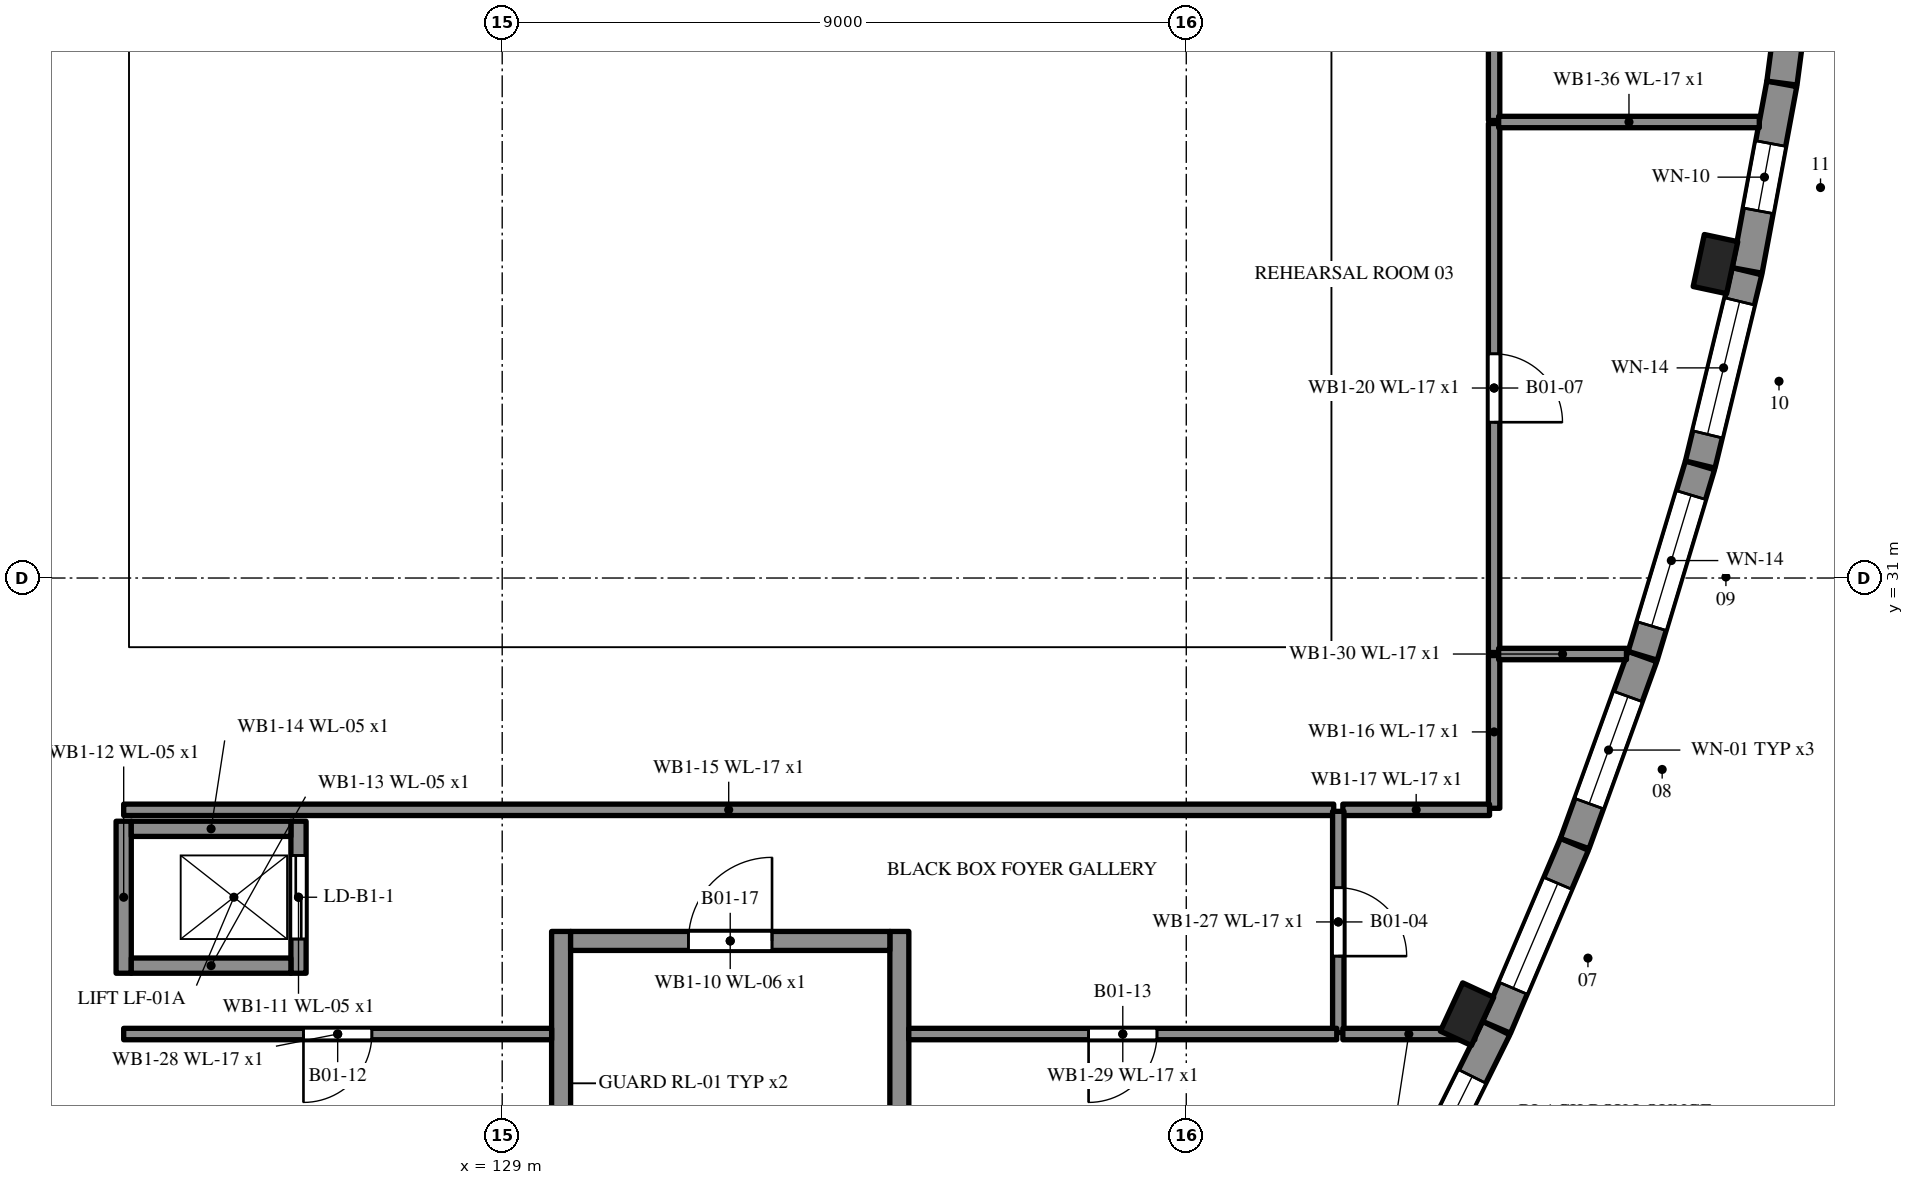
"""IFC4 building model, lengths in metres.
Left out: names, types, materials, properties, quantities, classifications, styles, units other than length and angle.
Written with IfcOpenShell. Run it as: python <this file> out.ifc"""

import sys

from ifc_helpers import new_model, si_unit, direction, frame, frame_2d, origin, origin_2d, place, context, subcontext, project, spatial, rectangle, extrude, element, fill, save


model = new_model("IFC4")
c1 = context("Model", 3, precision=1e-05, world=origin(), true_north=direction((0.0, 1.0)))
c2 = subcontext(c1, "Body", "Model", "MODEL_VIEW")
j1 = project(units=[si_unit("LENGTHUNIT", "METRE"), si_unit("PLANEANGLEUNIT", "RADIAN")], contexts=[c1])
p1 = place(None, origin())
s1 = spatial("IfcSite", under=j1, at=p1, CompositionType="ELEMENT")
p2 = place(p1, origin())
s2 = spatial("IfcBuilding", under=s1, at=p2, CompositionType="ELEMENT")
p3 = place(p2, frame((0.0, 0.0, 5.4)))
s3 = spatial("IfcBuildingStorey", under=s2, at=p3, CompositionType="ELEMENT", Elevation=5.4)
p4 = place(p3, frame((140.78, 22.463, 0.0), z_axis=(0.0, 0.0, 1.0), x_axis=(0.44433489597, 0.895860759395, 0.0)))
e1 = element("IfcWall", 1, at=p4, inside=s3, PredefinedType="SOLIDWALL", context=c2, shape_type="SweptSolid", body=[
    extrude(rectangle(XDim=2.92, YDim=0.4, at=frame_2d((1.46, 0.0))), origin(), (0.0, 0.0, 1.0), 4.8),
])
p5 = place(p4, frame((0.71, 0.0, 2.4)))
e2 = element("IfcOpeningElement", 2, at=p5, cuts=e1, PredefinedType="OPENING", context=c2, shape_type="SweptSolid", body=[
    extrude(rectangle(XDim=1.5, YDim=0.9, at=frame_2d((0.75, 0.45))), frame((0.0, 0.21, 0.0), z_axis=(0.0, -1.0, 0.0), x_axis=(1.0, 0.0, 0.0)), (0.0, 0.0, 1.0), 0.42),
])
p6 = place(p3, frame((142.083, 25.089, 0.0), z_axis=(0.0, 0.0, 1.0), x_axis=(0.391529943778, 0.920165367271, 0.0)))
e3 = element("IfcWall", 3, at=p6, inside=s3, PredefinedType="SOLIDWALL", context=c2, shape_type="SweptSolid", body=[
    extrude(rectangle(XDim=2.616, YDim=0.4, at=frame_2d((1.308, 0.0))), origin(), (0.0, 0.0, 1.0), 4.8),
])
p7 = place(p6, frame((0.558, 0.0, 0.9)))
e4 = element("IfcOpeningElement", 4, at=p7, cuts=e3, PredefinedType="OPENING", context=c2, shape_type="SweptSolid", body=[
    extrude(rectangle(XDim=1.5, YDim=2.1, at=frame_2d((0.75, 1.05))), frame((0.0, 0.21, 0.0), z_axis=(0.0, -1.0, 0.0), x_axis=(1.0, 0.0, 0.0)), (0.0, 0.0, 1.0), 0.42),
])
p8 = place(p3, frame((143.111, 27.506, 0.0), z_axis=(0.0, 0.0, 1.0), x_axis=(0.340394146267, 0.940282843184, 0.0)))
e5 = element("IfcWall", 5, at=p8, inside=s3, PredefinedType="SOLIDWALL", context=c2, shape_type="SweptSolid", body=[
    extrude(rectangle(XDim=2.616, YDim=0.4, at=frame_2d((1.308, 0.0))), origin(), (0.0, 0.0, 1.0), 4.8),
])
p9 = place(p8, frame((0.558, 0.0, 0.9)))
e6 = element("IfcOpeningElement", 6, at=p9, cuts=e5, PredefinedType="OPENING", context=c2, shape_type="SweptSolid", body=[
    extrude(rectangle(XDim=1.5, YDim=2.1, at=frame_2d((0.75, 1.05))), frame((0.0, 0.21, 0.0), z_axis=(0.0, -1.0, 0.0), x_axis=(1.0, 0.0, 0.0)), (0.0, 0.0, 1.0), 0.42),
])
p10 = place(p3, frame((144.005, 29.977, 0.0), z_axis=(0.0, 0.0, 1.0), x_axis=(0.288212317298, 0.957566530408, 0.0)))
e7 = element("IfcWall", 7, at=p10, inside=s3, PredefinedType="SOLIDWALL", context=c2, shape_type="SweptSolid", body=[
    extrude(rectangle(XDim=2.617, YDim=0.4, at=frame_2d((1.308, 0.0))), origin(), (0.0, 0.0, 1.0), 4.8),
])
p11 = place(p10, frame((0.408, 0.0, 0.9)))
e8 = element("IfcOpeningElement", 8, at=p11, cuts=e7, PredefinedType="OPENING", context=c2, shape_type="SweptSolid", body=[
    extrude(rectangle(XDim=1.8, YDim=2.1, at=frame_2d((0.9, 1.05))), frame((0.0, 0.21, 0.0), z_axis=(0.0, -1.0, 0.0), x_axis=(1.0, 0.0, 0.0)), (0.0, 0.0, 1.0), 0.42),
])
p12 = place(p3, frame((144.762, 32.493, 0.0), z_axis=(0.0, 0.0, 1.0), x_axis=(0.235108668597, 0.971969091047, 0.0)))
e9 = element("IfcWall", 9, at=p12, inside=s3, PredefinedType="SOLIDWALL", context=c2, shape_type="SweptSolid", body=[
    extrude(rectangle(XDim=2.617, YDim=0.4, at=frame_2d((1.308, 0.0))), origin(), (0.0, 0.0, 1.0), 4.8),
])
p13 = place(p12, frame((0.408, 0.0, 0.9)))
e10 = element("IfcOpeningElement", 10, at=p13, cuts=e9, PredefinedType="OPENING", context=c2, shape_type="SweptSolid", body=[
    extrude(rectangle(XDim=1.8, YDim=2.1, at=frame_2d((0.9, 1.05))), frame((0.0, 0.21, 0.0), z_axis=(0.0, -1.0, 0.0), x_axis=(1.0, 0.0, 0.0)), (0.0, 0.0, 1.0), 0.42),
])
p14 = place(p3, frame((145.379, 35.047, 0.0), z_axis=(0.0, 0.0, 1.0), x_axis=(0.182652956339, 0.983177449671, 0.0)))
e11 = element("IfcWall", 11, at=p14, inside=s3, PredefinedType="SOLIDWALL", context=c2, shape_type="SweptSolid", body=[
    extrude(rectangle(XDim=2.497, YDim=0.4, at=frame_2d((1.249, 0.0))), origin(), (0.0, 0.0, 1.0), 4.8),
])
p15 = place(p14, frame((0.798, 0.0, 0.9)))
e12 = element("IfcOpeningElement", 12, at=p15, cuts=e11, PredefinedType="OPENING", context=c2, shape_type="SweptSolid", body=[
    extrude(rectangle(XDim=0.9, YDim=2.1, at=frame_2d((0.45, 1.05))), frame((0.0, 0.21, 0.0), z_axis=(0.0, -1.0, 0.0), x_axis=(1.0, 0.0, 0.0)), (0.0, 0.0, 1.0), 0.42),
])
p16 = place(p3, frame((145.837, 37.512, 0.0), z_axis=(0.0, 0.0, 1.0), x_axis=(0.130722601708, 0.991418983782, 0.0)))
e13 = element("IfcWall", 13, at=p16, inside=s3, PredefinedType="SOLIDWALL", context=c2, shape_type="SweptSolid", body=[
    extrude(rectangle(XDim=2.497, YDim=0.4, at=frame_2d((1.249, 0.0))), origin(), (0.0, 0.0, 1.0), 4.8),
])
p17 = place(p16, frame((0.499, 0.0, 0.9)))
e14 = element("IfcOpeningElement", 14, at=p17, cuts=e13, PredefinedType="OPENING", context=c2, shape_type="SweptSolid", body=[
    extrude(rectangle(XDim=1.5, YDim=2.1, at=frame_2d((0.75, 1.05))), frame((0.0, 0.21, 0.0), z_axis=(0.0, -1.0, 0.0), x_axis=(1.0, 0.0, 0.0)), (0.0, 0.0, 1.0), 0.42),
])
p18 = place(p3, frame((121.922, 25.078, 0.0), z_axis=(0.0, 0.0, 1.0), x_axis=(0.44433489597, -0.895860759395, 0.0)))
e15 = element("IfcWall", 15, at=p18, inside=s3, PredefinedType="SOLIDWALL", context=c2, shape_type="SweptSolid", body=[
    extrude(rectangle(XDim=2.92, YDim=0.4, at=frame_2d((1.46, 0.0))), origin(), (0.0, 0.0, 1.0), 4.8),
])
p19 = place(p18, frame((0.71, 0.0, 2.4)))
e16 = element("IfcOpeningElement", 16, at=p19, cuts=e15, PredefinedType="OPENING", context=c2, shape_type="SweptSolid", body=[
    extrude(rectangle(XDim=1.5, YDim=0.9, at=frame_2d((0.75, 0.45))), frame((0.0, 0.21, 0.0), z_axis=(0.0, -1.0, 0.0), x_axis=(1.0, 0.0, 0.0)), (0.0, 0.0, 1.0), 0.42),
])
for number, where, z_axis, x_axis in (
    (17, (141.694, 25.261, 0.0), (0.0, 0.0, 1.0), (0.42, 0.908, 0.0)),
    (18, (144.963, 35.131, 0.0), (0.0, 0.0, 1.0), (0.21, 0.978, 0.0)),
):
    element("IfcColumn", number, at=place(p3, frame(where, z_axis=z_axis, x_axis=x_axis)), inside=s3, PredefinedType="PILASTER", context=c2, shape_type="SweptSolid", body=[
        extrude(rectangle(XDim=0.7, YDim=0.45, at=origin_2d()), origin(), (0.0, 0.0, 1.0), 4.8),
    ])
for number, where, z_axis, x_axis in (
    (19, (129.775, 26.35, 0.0), (0.0, 0.0, 1.0), (0.0, -1.0, 0.0)),
    (20, (134.225, 17.8, 0.0), (0.0, 0.0, 1.0), (0.0, 1.0, 0.0)),
):
    element("IfcWall", number, at=place(p3, frame(where, z_axis=z_axis, x_axis=x_axis)), inside=s3, PredefinedType="SHEAR", context=c2, shape_type="SweptSolid", body=[
        extrude(rectangle(XDim=8.55, YDim=0.25, at=frame_2d((4.275, 0.0))), origin(), (0.0, 0.0, 1.0), 4.5),
    ])
p20 = place(p3, frame((129.9, 26.225, 0.0), z_axis=(0.0, 0.0, 1.0), x_axis=(1.0, 0.0, 0.0)))
e21 = element("IfcWall", 21, at=p20, inside=s3, PredefinedType="SHEAR", context=c2, shape_type="SweptSolid", body=[
    extrude(rectangle(XDim=4.2, YDim=0.25, at=frame_2d((2.1, 0.0))), origin(), (0.0, 0.0, 1.0), 4.5),
])
p21 = place(p20, frame((1.55, 0.0, 0.0)))
e22 = element("IfcOpeningElement", 22, at=p21, cuts=e21, PredefinedType="OPENING", context=c2, shape_type="SweptSolid", body=[
    extrude(rectangle(XDim=1.1, YDim=2.1, at=frame_2d((0.55, 1.05))), frame((0.0, 0.135, 0.0), z_axis=(0.0, -1.0, 0.0), x_axis=(1.0, 0.0, 0.0)), (0.0, 0.0, 1.0), 0.27),
])
p22 = place(p3, frame((126.32, 25.8, 0.0), z_axis=(0.0, 0.0, 1.0), x_axis=(0.0, 1.0, 0.0)))
e23 = element("IfcWall", 23, at=p22, inside=s3, PredefinedType="SHEAR", context=c2, shape_type="SweptSolid", body=[
    extrude(rectangle(XDim=2.0, YDim=0.2, at=frame_2d((1.0, 0.0))), origin(), (0.0, 0.0, 1.0), 3.9),
])
p23 = place(p22, frame((0.45, 0.0, 0.0)))
e24 = element("IfcOpeningElement", 24, at=p23, cuts=e23, PredefinedType="OPENING", context=c2, shape_type="SweptSolid", body=[
    extrude(rectangle(XDim=1.1, YDim=2.2, at=frame_2d((0.55, 1.1))), frame((0.0, 0.11, 0.0), z_axis=(0.0, -1.0, 0.0), x_axis=(1.0, 0.0, 0.0)), (0.0, 0.0, 1.0), 0.22),
])
p24 = place(p3, frame((124.02, 27.8, 0.0), z_axis=(0.0, 0.0, 1.0), x_axis=(0.0, -1.0, 0.0)))
e25 = element("IfcWall", 25, at=p24, inside=s3, PredefinedType="SHEAR", context=c2, shape_type="SweptSolid", body=[
    extrude(rectangle(XDim=2.0, YDim=0.2, at=frame_2d((1.0, 0.0))), origin(), (0.0, 0.0, 1.0), 3.9),
])
for number, where, z_axis, x_axis in (
    (26, (124.12, 25.9, 0.0), (0.0, 0.0, 1.0), (1.0, 0.0, 0.0)),
    (27, (126.22, 27.7, 0.0), (0.0, 0.0, 1.0), (-1.0, 0.0, 0.0)),
):
    element("IfcWall", number, at=place(p3, frame(where, z_axis=z_axis, x_axis=x_axis)), inside=s3, PredefinedType="SHEAR", context=c2, shape_type="SweptSolid", body=[
        extrude(rectangle(XDim=2.1, YDim=0.2, at=frame_2d((1.05, 0.0))), origin(), (0.0, 0.0, 1.0), 3.9),
    ])
p25 = place(p3, frame((139.94, 27.95, 0.0), z_axis=(0.0, 0.0, 1.0), x_axis=(-1.0, 0.0, 0.0)))
e28 = element("IfcWall", 28, at=p25, inside=s3, PredefinedType="PARTITIONING", context=c2, shape_type="SweptSolid", body=[
    extrude(rectangle(XDim=15.92, YDim=0.15, at=frame_2d((7.96, 0.0))), origin(), (0.0, 0.0, 1.0), 4.5),
])
p26 = place(p3, frame((142.05, 29.98, 0.0), z_axis=(0.0, 0.0, 1.0), x_axis=(0.0, -1.0, 0.0)))
e29 = element("IfcWall", 29, at=p26, inside=s3, PredefinedType="PARTITIONING", context=c2, shape_type="SweptSolid", body=[
    extrude(rectangle(XDim=2.01, YDim=0.15, at=frame_2d((1.005, 0.0))), origin(), (0.0, 0.0, 1.0), 4.5),
])
p27 = place(p3, frame((141.99, 27.95, 0.0), z_axis=(0.0, 0.0, 1.0), x_axis=(-1.0, 0.0, 0.0)))
e30 = element("IfcWall", 30, at=p27, inside=s3, PredefinedType="PARTITIONING", context=c2, shape_type="SweptSolid", body=[
    extrude(rectangle(XDim=1.93, YDim=0.15, at=frame_2d((0.965, 0.0))), origin(), (0.0, 0.0, 1.0), 4.5),
])
p28 = place(p3, frame((142.05, 36.98, 0.0), z_axis=(0.0, 0.0, 1.0), x_axis=(0.0, -1.0, 0.0)))
e31 = element("IfcWall", 31, at=p28, inside=s3, PredefinedType="PARTITIONING", context=c2, shape_type="SweptSolid", body=[
    extrude(rectangle(XDim=6.96, YDim=0.15, at=frame_2d((3.48, 0.0))), origin(), (0.0, 0.0, 1.0), 4.5),
])
p29 = place(p28, frame((3.03, 0.0, 0.0)))
e32 = element("IfcOpeningElement", 32, at=p29, cuts=e31, PredefinedType="OPENING", context=c2, shape_type="SweptSolid", body=[
    extrude(rectangle(XDim=0.9, YDim=2.1, at=frame_2d((0.45, 1.05))), frame((0.0, 0.085, 0.0), z_axis=(0.0, -1.0, 0.0), x_axis=(1.0, 0.0, 0.0)), (0.0, 0.0, 1.0), 0.17),
])
p30 = place(p3, frame((142.05, 42.98, 0.0), z_axis=(0.0, 0.0, 1.0), x_axis=(0.0, -1.0, 0.0)))
e33 = element("IfcWall", 33, at=p30, inside=s3, PredefinedType="PARTITIONING", context=c2, shape_type="SweptSolid", body=[
    extrude(rectangle(XDim=5.96, YDim=0.15, at=frame_2d((2.98, 0.0))), origin(), (0.0, 0.0, 1.0), 4.5),
])
p31 = place(p30, frame((2.53, 0.0, 0.0)))
e34 = element("IfcOpeningElement", 34, at=p31, cuts=e33, PredefinedType="OPENING", context=c2, shape_type="SweptSolid", body=[
    extrude(rectangle(XDim=0.9, YDim=2.1, at=frame_2d((0.45, 1.05))), frame((0.0, 0.085, 0.0), z_axis=(0.0, -1.0, 0.0), x_axis=(1.0, 0.0, 0.0)), (0.0, 0.0, 1.0), 0.17),
])
p32 = place(p3, frame((140.0, 27.93, 0.0), z_axis=(0.0, 0.0, 1.0), x_axis=(0.0, -1.0, 0.0)))
e35 = element("IfcWall", 35, at=p32, inside=s3, PredefinedType="PARTITIONING", context=c2, shape_type="SweptSolid", body=[
    extrude(rectangle(XDim=2.91, YDim=0.15, at=frame_2d((1.455, 0.0))), origin(), (0.0, 0.0, 1.0), 4.5),
])
p33 = place(p32, frame((1.005, 0.0, 0.0)))
e36 = element("IfcOpeningElement", 36, at=p33, cuts=e35, PredefinedType="OPENING", context=c2, shape_type="SweptSolid", body=[
    extrude(rectangle(XDim=0.9, YDim=2.1, at=frame_2d((0.45, 1.05))), frame((0.0, 0.085, 0.0), z_axis=(0.0, -1.0, 0.0), x_axis=(1.0, 0.0, 0.0)), (0.0, 0.0, 1.0), 0.17),
])
p34 = place(p3, frame((129.65, 25.0, 0.0), z_axis=(0.0, 0.0, 1.0), x_axis=(-1.0, 0.0, 0.0)))
e37 = element("IfcWall", 37, at=p34, inside=s3, PredefinedType="PARTITIONING", context=c2, shape_type="SweptSolid", body=[
    extrude(rectangle(XDim=5.63, YDim=0.15, at=frame_2d((2.815, 0.0))), origin(), (0.0, 0.0, 1.0), 4.5),
])
p35 = place(p34, frame((2.365, 0.0, 0.0)))
e38 = element("IfcOpeningElement", 38, at=p35, cuts=e37, PredefinedType="OPENING", context=c2, shape_type="SweptSolid", body=[
    extrude(rectangle(XDim=0.9, YDim=2.1, at=frame_2d((0.45, 1.05))), frame((0.0, 0.085, 0.0), z_axis=(0.0, -1.0, 0.0), x_axis=(1.0, 0.0, 0.0)), (0.0, 0.0, 1.0), 0.17),
])
p36 = place(p3, frame((139.98, 25.0, 0.0), z_axis=(0.0, 0.0, 1.0), x_axis=(-1.0, 0.0, 0.0)))
e39 = element("IfcWall", 39, at=p36, inside=s3, PredefinedType="PARTITIONING", context=c2, shape_type="SweptSolid", body=[
    extrude(rectangle(XDim=5.63, YDim=0.15, at=frame_2d((2.815, 0.0))), origin(), (0.0, 0.0, 1.0), 4.5),
])
p37 = place(p36, frame((2.365, 0.0, 0.0)))
e40 = element("IfcOpeningElement", 40, at=p37, cuts=e39, PredefinedType="OPENING", context=c2, shape_type="SweptSolid", body=[
    extrude(rectangle(XDim=0.9, YDim=2.1, at=frame_2d((0.45, 1.05))), frame((0.0, 0.085, 0.0), z_axis=(0.0, -1.0, 0.0), x_axis=(1.0, 0.0, 0.0)), (0.0, 0.0, 1.0), 0.17),
])
p38 = place(p3, frame((142.11, 30.0, 0.0), z_axis=(0.0, 0.0, 1.0), x_axis=(1.0, 0.0, 0.0)))
e41 = element("IfcWall", 41, at=p38, inside=s3, PredefinedType="PARTITIONING", context=c2, shape_type="SweptSolid", body=[
    extrude(rectangle(XDim=1.681, YDim=0.15, at=frame_2d((0.841, 0.0))), origin(), (0.0, 0.0, 1.0), 4.5),
])
p39 = place(p3, frame((141.796, 25.0, 0.0), z_axis=(0.0, 0.0, 1.0), x_axis=(-1.0, 0.0, 0.0)))
e42 = element("IfcWall", 42, at=p39, inside=s3, PredefinedType="PARTITIONING", context=c2, shape_type="SweptSolid", body=[
    extrude(rectangle(XDim=1.736, YDim=0.15, at=frame_2d((0.868, 0.0))), origin(), (0.0, 0.0, 1.0), 4.5),
])
p40 = place(p3, frame((142.11, 37.0, 0.0), z_axis=(0.0, 0.0, 1.0), x_axis=(1.0, 0.0, 0.0)))
e43 = element("IfcWall", 43, at=p40, inside=s3, PredefinedType="PARTITIONING", context=c2, shape_type="SweptSolid", body=[
    extrude(rectangle(XDim=3.429, YDim=0.15, at=frame_2d((1.714, 0.0))), origin(), (0.0, 0.0, 1.0), 4.5),
])
p41 = place(p5, origin())
e44 = element("IfcWindow", 44, at=p41, inside=s3, PartitioningType="SINGLE_PANEL", PredefinedType="WINDOW", context=c2, shape_type="SweptSolid", body=[
    extrude(rectangle(XDim=1.5, YDim=0.9, at=frame_2d((0.75, 0.45))), frame((0.0, 0.03, 0.0), z_axis=(0.0, -1.0, 0.0), x_axis=(1.0, 0.0, 0.0)), (0.0, 0.0, 1.0), 0.06),
])
fill(e2, e44)
p42 = place(p7, origin())
e45 = element("IfcWindow", 45, at=p42, inside=s3, PartitioningType="SINGLE_PANEL", PredefinedType="WINDOW", context=c2, shape_type="SweptSolid", body=[
    extrude(rectangle(XDim=1.5, YDim=2.1, at=frame_2d((0.75, 1.05))), frame((0.0, 0.03, 0.0), z_axis=(0.0, -1.0, 0.0), x_axis=(1.0, 0.0, 0.0)), (0.0, 0.0, 1.0), 0.06),
])
fill(e4, e45)
p43 = place(p9, origin())
e46 = element("IfcWindow", 46, at=p43, inside=s3, PartitioningType="SINGLE_PANEL", PredefinedType="WINDOW", context=c2, shape_type="SweptSolid", body=[
    extrude(rectangle(XDim=1.5, YDim=2.1, at=frame_2d((0.75, 1.05))), frame((0.0, 0.03, 0.0), z_axis=(0.0, -1.0, 0.0), x_axis=(1.0, 0.0, 0.0)), (0.0, 0.0, 1.0), 0.06),
])
fill(e6, e46)
p44 = place(p11, origin())
e47 = element("IfcWindow", 47, at=p44, inside=s3, PartitioningType="SINGLE_PANEL", PredefinedType="WINDOW", context=c2, shape_type="SweptSolid", body=[
    extrude(rectangle(XDim=1.8, YDim=2.1, at=frame_2d((0.9, 1.05))), frame((0.0, 0.03, 0.0), z_axis=(0.0, -1.0, 0.0), x_axis=(1.0, 0.0, 0.0)), (0.0, 0.0, 1.0), 0.06),
])
fill(e8, e47)
p45 = place(p13, origin())
e48 = element("IfcWindow", 48, at=p45, inside=s3, PartitioningType="SINGLE_PANEL", PredefinedType="WINDOW", context=c2, shape_type="SweptSolid", body=[
    extrude(rectangle(XDim=1.8, YDim=2.1, at=frame_2d((0.9, 1.05))), frame((0.0, 0.03, 0.0), z_axis=(0.0, -1.0, 0.0), x_axis=(1.0, 0.0, 0.0)), (0.0, 0.0, 1.0), 0.06),
])
fill(e10, e48)
p46 = place(p15, origin())
e49 = element("IfcWindow", 49, at=p46, inside=s3, PartitioningType="SINGLE_PANEL", PredefinedType="WINDOW", context=c2, shape_type="SweptSolid", body=[
    extrude(rectangle(XDim=0.9, YDim=2.1, at=frame_2d((0.45, 1.05))), frame((0.0, 0.03, 0.0), z_axis=(0.0, -1.0, 0.0), x_axis=(1.0, 0.0, 0.0)), (0.0, 0.0, 1.0), 0.06),
])
fill(e12, e49)
p47 = place(p23, origin())
e50 = element("IfcDoor", 50, at=p47, inside=s3, OperationType="SLIDING_TO_LEFT", PredefinedType="DOOR", context=c2, shape_type="SweptSolid", body=[
    extrude(rectangle(XDim=1.1, YDim=2.2, at=frame_2d((0.55, 1.1))), frame((0.0, 0.025, 0.0), z_axis=(0.0, -1.0, 0.0), x_axis=(1.0, 0.0, 0.0)), (0.0, 0.0, 1.0), 0.05),
])
fill(e24, e50)
p48 = place(p33, origin())
e51 = element("IfcDoor", 51, at=p48, inside=s3, OperationType="SINGLE_SWING_RIGHT", PredefinedType="DOOR", context=c2, shape_type="SweptSolid", body=[
    extrude(rectangle(XDim=0.9, YDim=2.1, at=frame_2d((0.45, 1.05))), frame((0.0, 0.025, 0.0), z_axis=(0.0, -1.0, 0.0), x_axis=(1.0, 0.0, 0.0)), (0.0, 0.0, 1.0), 0.05),
])
fill(e36, e51)
p49 = place(p29, origin())
e52 = element("IfcDoor", 52, at=p49, inside=s3, OperationType="SINGLE_SWING_RIGHT", PredefinedType="DOOR", context=c2, shape_type="SweptSolid", body=[
    extrude(rectangle(XDim=0.9, YDim=2.1, at=frame_2d((0.45, 1.05))), frame((0.0, 0.025, 0.0), z_axis=(0.0, -1.0, 0.0), x_axis=(1.0, 0.0, 0.0)), (0.0, 0.0, 1.0), 0.05),
])
fill(e32, e52)
p50 = place(p35, origin())
e53 = element("IfcDoor", 53, at=p50, inside=s3, OperationType="SINGLE_SWING_RIGHT", PredefinedType="DOOR", context=c2, shape_type="SweptSolid", body=[
    extrude(rectangle(XDim=0.9, YDim=2.1, at=frame_2d((0.45, 1.05))), frame((0.0, 0.025, 0.0), z_axis=(0.0, -1.0, 0.0), x_axis=(1.0, 0.0, 0.0)), (0.0, 0.0, 1.0), 0.05),
])
fill(e38, e53)
p51 = place(p37, origin())
e54 = element("IfcDoor", 54, at=p51, inside=s3, OperationType="SINGLE_SWING_RIGHT", PredefinedType="DOOR", context=c2, shape_type="SweptSolid", body=[
    extrude(rectangle(XDim=0.9, YDim=2.1, at=frame_2d((0.45, 1.05))), frame((0.0, 0.025, 0.0), z_axis=(0.0, -1.0, 0.0), x_axis=(1.0, 0.0, 0.0)), (0.0, 0.0, 1.0), 0.05),
])
fill(e40, e54)
p52 = place(p21, origin())
e55 = element("IfcDoor", 55, at=p52, inside=s3, OperationType="SINGLE_SWING_RIGHT", PredefinedType="DOOR", context=c2, shape_type="SweptSolid", body=[
    extrude(rectangle(XDim=1.1, YDim=2.1, at=frame_2d((0.55, 1.05))), frame((0.0, 0.025, 0.0), z_axis=(0.0, -1.0, 0.0), x_axis=(1.0, 0.0, 0.0)), (0.0, 0.0, 1.0), 0.05),
])
fill(e22, e55)
save(model, sys.argv[1])
